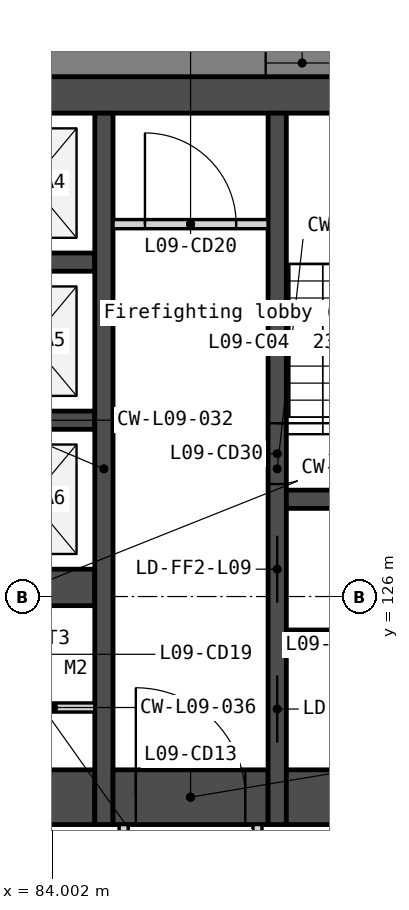
"""IFC4 building model, lengths in metres.
Left out: names, types, materials, properties, quantities, classifications, styles, units other than length and angle.
Written with IfcOpenShell. Run it as: python <this file> out.ifc"""

import sys

from ifc_helpers import new_model, si_unit, direction, frame, frame_2d, origin, place, context, subcontext, project, spatial, polyline, rectangle, outline, extrude, element, fill, save


model = new_model("IFC4")
c1 = context("Model", 3, precision=1e-05, world=origin(), true_north=direction((0.0, 1.0)))
c2 = subcontext(c1, "Body", "Model", "MODEL_VIEW")
j1 = project(units=[si_unit("LENGTHUNIT", "METRE"), si_unit("PLANEANGLEUNIT", "RADIAN")], contexts=[c1])
p1 = place(None, origin())
s1 = spatial("IfcSite", under=j1, at=p1, CompositionType="ELEMENT")
p2 = place(p1, origin())
s2 = spatial("IfcBuilding", under=s1, at=p2, CompositionType="ELEMENT")
p3 = place(p2, frame((0.0, 0.0, 45.5)))
s3 = spatial("IfcBuildingStorey", under=s2, at=p3, CompositionType="ELEMENT", Elevation=45.5)
p4 = place(p3, frame((66.0, 134.25, 0.0), z_axis=(0.0, 0.0, 1.0), x_axis=(1.0, 0.0, 0.0)))
e1 = element("IfcWall", 1, at=p4, inside=s3, PredefinedType="SOLIDWALL", context=c2, shape_type="SweptSolid", body=[
    extrude(rectangle(XDim=28.0, YDim=0.6, at=frame_2d((14.0, 0.0))), origin(), (0.0, 0.0, 1.0), 3.35),
])
p5 = place(p3, frame((81.8, 122.7, 0.0), z_axis=(0.0, 0.0, 1.0), x_axis=(1.0, 0.0, 0.0)))
e2 = element("IfcWall", 2, at=p5, inside=s3, PredefinedType="SOLIDWALL", context=c2, shape_type="SweptSolid", body=[
    extrude(rectangle(XDim=2.9, YDim=0.9, at=frame_2d((1.45, 0.0))), origin(), (0.0, 0.0, 1.0), 3.35),
])
p6 = place(p5, frame((0.05, 0.0, 0.0)))
e3 = element("IfcOpeningElement", 3, at=p6, cuts=e2, PredefinedType="OPENING", context=c2, shape_type="SweptSolid", body=[
    extrude(rectangle(XDim=1.5, YDim=2.1, at=frame_2d((0.75, 1.05))), frame((0.0, 0.46, 0.0), z_axis=(0.0, -1.0, 0.0), x_axis=(1.0, 0.0, 0.0)), (0.0, 0.0, 1.0), 0.92),
])
for number, where, z_axis, x_axis in (
    (4, (82.6, 131.5, 0.0), (0.0, 0.0, 1.0), (1.0, 0.0, 0.0)),
    (5, (82.6, 128.9, 0.0), (0.0, 0.0, 1.0), (1.0, 0.0, 0.0)),
):
    element("IfcWall", number, at=place(p3, frame(where, z_axis=z_axis, x_axis=x_axis)), inside=s3, PredefinedType="SOLIDWALL", context=c2, shape_type="SweptSolid", body=[
        extrude(rectangle(XDim=2.1, YDim=0.3, at=frame_2d((1.05, 0.0))), origin(), (0.0, 0.0, 1.0), 3.35),
    ])
p7 = place(p3, frame((82.6, 126.15, 0.0), z_axis=(0.0, 0.0, 1.0), x_axis=(1.0, 0.0, 0.0)))
e6 = element("IfcWall", 6, at=p7, inside=s3, PredefinedType="SOLIDWALL", context=c2, shape_type="SweptSolid", body=[
    extrude(rectangle(XDim=2.1, YDim=0.6, at=frame_2d((1.05, 0.0))), origin(), (0.0, 0.0, 1.0), 3.35),
])
p8 = place(p3, frame((83.35, 124.175, 0.0), z_axis=(0.0, 0.0, 1.0), x_axis=(1.0, 0.0, 0.0)))
e7 = element("IfcWall", 7, at=p8, inside=s3, PredefinedType="PARTITIONING", context=c2, shape_type="SweptSolid", body=[
    extrude(rectangle(XDim=1.35, YDim=0.15, at=frame_2d((0.675, 0.0))), origin(), (0.0, 0.0, 1.0), 3.35),
])
p9 = place(p3, frame((84.85, 133.95, 0.0), z_axis=(0.0, 0.0, 1.0), x_axis=(0.0, -1.0, 0.0)))
e8 = element("IfcWall", 8, at=p9, inside=s3, PredefinedType="SOLIDWALL", context=c2, shape_type="SweptSolid", body=[
    extrude(rectangle(XDim=11.7, YDim=0.3, at=frame_2d((5.85, 0.0))), origin(), (0.0, 0.0, 1.0), 3.35),
])
p10 = place(p3, frame((85.0, 132.125, 0.0), z_axis=(0.0, 0.0, 1.0), x_axis=(1.0, 0.0, 0.0)))
e9 = element("IfcWall", 9, at=p10, inside=s3, PredefinedType="PARTITIONING", context=c2, shape_type="SweptSolid", body=[
    extrude(rectangle(XDim=2.55, YDim=0.15, at=frame_2d((1.275, 0.0))), origin(), (0.0, 0.0, 1.0), 3.35),
])
p11 = place(p10, frame((0.525, 0.0, 0.0)))
e10 = element("IfcOpeningElement", 10, at=p11, cuts=e9, PredefinedType="OPENING", context=c2, shape_type="SweptSolid", body=[
    extrude(rectangle(XDim=1.5, YDim=2.1, at=frame_2d((0.75, 1.05))), frame((0.0, 0.085, 0.0), z_axis=(0.0, -1.0, 0.0), x_axis=(1.0, 0.0, 0.0)), (0.0, 0.0, 1.0), 0.17),
])
p12 = place(p3, frame((85.0, 122.7, 0.0), z_axis=(0.0, 0.0, 1.0), x_axis=(1.0, 0.0, 0.0)))
e11 = element("IfcWall", 11, at=p12, inside=s3, PredefinedType="SOLIDWALL", context=c2, shape_type="SweptSolid", body=[
    extrude(rectangle(XDim=2.55, YDim=0.9, at=frame_2d((1.275, 0.0))), origin(), (0.0, 0.0, 1.0), 3.35),
])
p13 = place(p12, frame((0.375, 0.0, 0.0)))
e12 = element("IfcOpeningElement", 12, at=p13, cuts=e11, PredefinedType="OPENING", context=c2, shape_type="SweptSolid", body=[
    extrude(rectangle(XDim=1.8, YDim=2.1, at=frame_2d((0.9, 1.05))), frame((0.0, 0.46, 0.0), z_axis=(0.0, -1.0, 0.0), x_axis=(1.0, 0.0, 0.0)), (0.0, 0.0, 1.0), 0.92),
])
p14 = place(p3, frame((85.175, 122.25, 0.0), z_axis=(0.0, 0.0, 1.0), x_axis=(0.0, -1.0, 0.0)))
e13 = element("IfcWall", 13, at=p14, inside=s3, PredefinedType="PARTITIONING", context=c2, shape_type="SweptSolid", body=[
    extrude(rectangle(XDim=2.1, YDim=0.15, at=frame_2d((1.05, 0.0))), origin(), (0.0, 0.0, 1.0), 3.35),
])
p15 = place(p14, frame((0.55, 0.0, 0.0)))
e14 = element("IfcOpeningElement", 14, at=p15, cuts=e13, PredefinedType="OPENING", context=c2, shape_type="SweptSolid", body=[
    extrude(rectangle(XDim=1.0, YDim=2.1, at=frame_2d((0.5, 1.05))), frame((0.0, 0.085, 0.0), z_axis=(0.0, -1.0, 0.0), x_axis=(1.0, 0.0, 0.0)), (0.0, 0.0, 1.0), 0.17),
])
p16 = place(p3, frame((87.375, 122.25, 0.0), z_axis=(0.0, 0.0, 1.0), x_axis=(0.0, -1.0, 0.0)))
e15 = element("IfcWall", 15, at=p16, inside=s3, PredefinedType="PARTITIONING", context=c2, shape_type="SweptSolid", body=[
    extrude(rectangle(XDim=2.1, YDim=0.15, at=frame_2d((1.05, 0.0))), origin(), (0.0, 0.0, 1.0), 3.35),
])
p17 = place(p3, frame((87.7, 133.95, 0.0), z_axis=(0.0, 0.0, 1.0), x_axis=(0.0, -1.0, 0.0)))
e16 = element("IfcWall", 16, at=p17, inside=s3, PredefinedType="SOLIDWALL", context=c2, shape_type="SweptSolid", body=[
    extrude(rectangle(XDim=11.7, YDim=0.3, at=frame_2d((5.85, 0.0))), origin(), (0.0, 0.0, 1.0), 3.35),
])
p18 = place(p17, frame((6.95, 0.0, 0.0)))
e17 = element("IfcOpeningElement", 17, at=p18, cuts=e16, PredefinedType="OPENING", context=c2, shape_type="SweptSolid", body=[
    extrude(rectangle(XDim=1.1, YDim=2.1, at=frame_2d((0.55, 1.05))), frame((0.0, 0.16, 0.0), z_axis=(0.0, -1.0, 0.0), x_axis=(1.0, 0.0, 0.0)), (0.0, 0.0, 1.0), 0.32),
])
p19 = place(p17, frame((5.1, 0.0, 0.0)))
e18 = element("IfcOpeningElement", 18, at=p19, cuts=e16, PredefinedType="OPENING", context=c2, shape_type="SweptSolid", body=[
    extrude(rectangle(XDim=1.0, YDim=2.1, at=frame_2d((0.5, 1.05))), frame((0.0, 0.16, 0.0), z_axis=(0.0, -1.0, 0.0), x_axis=(1.0, 0.0, 0.0)), (0.0, 0.0, 1.0), 0.32),
])
p20 = place(p17, frame((9.25, 0.0, 0.0)))
e19 = element("IfcOpeningElement", 19, at=p20, cuts=e16, PredefinedType="OPENING", context=c2, shape_type="SweptSolid", body=[
    extrude(rectangle(XDim=1.1, YDim=2.1, at=frame_2d((0.55, 1.05))), frame((0.0, 0.16, 0.0), z_axis=(0.0, -1.0, 0.0), x_axis=(1.0, 0.0, 0.0)), (0.0, 0.0, 1.0), 0.32),
])
for number, where, z_axis, x_axis in (
    (20, (87.85, 127.6, 0.0), (0.0, 0.0, 1.0), (1.0, 0.0, 0.0)),
    (21, (87.85, 125.3, 0.0), (0.0, 0.0, 1.0), (1.0, 0.0, 0.0)),
):
    element("IfcWall", number, at=place(p3, frame(where, z_axis=z_axis, x_axis=x_axis)), inside=s3, PredefinedType="SOLIDWALL", context=c2, shape_type="SweptSolid", body=[
        extrude(rectangle(XDim=2.55, YDim=0.3, at=frame_2d((1.275, 0.0))), origin(), (0.0, 0.0, 1.0), 3.35),
    ])
p21 = place(p3, frame((87.85, 122.7, 0.0), z_axis=(0.0, 0.0, 1.0), x_axis=(1.0, 0.0, 0.0)))
e22 = element("IfcWall", 22, at=p21, inside=s3, PredefinedType="SOLIDWALL", context=c2, shape_type="SweptSolid", body=[
    extrude(rectangle(XDim=2.55, YDim=0.9, at=frame_2d((1.275, 0.0))), origin(), (0.0, 0.0, 1.0), 3.35),
])
p22 = place(p3, frame((102.4, 134.775, -0.15), z_axis=(0.0, 0.0, 1.0), x_axis=(-1.0, 0.0, 0.0)))
e23 = element("IfcWall", 23, at=p22, inside=s3, PredefinedType="SOLIDWALL", context=c2, shape_type="SweptSolid", body=[
    extrude(outline(polyline([(0.0, 0.0), (0.0, 3.5), (38.62, 3.5), (38.62, 0.0), (0.0, 0.0)])), frame((0.0, 0.225, 0.0), z_axis=(0.0, -1.0, 0.0), x_axis=(1.0, 0.0, 0.0)), (0.0, 0.0, 1.0), 0.45),
])
p23 = place(p22, frame((3.03, 0.0, 1.05)))
e24 = element("IfcOpeningElement", 24, at=p23, cuts=e23, PredefinedType="OPENING", context=c2, shape_type="SweptSolid", body=[
    extrude(rectangle(XDim=1.2, YDim=1.5, at=frame_2d((0.6, 0.75))), frame((0.0, 0.235, 0.0), z_axis=(0.0, -1.0, 0.0), x_axis=(1.0, 0.0, 0.0)), (0.0, 0.0, 1.0), 0.47),
])
p24 = place(p22, frame((4.73, 0.0, 1.05)))
e25 = element("IfcOpeningElement", 25, at=p24, cuts=e23, PredefinedType="OPENING", context=c2, shape_type="SweptSolid", body=[
    extrude(rectangle(XDim=1.2, YDim=1.5, at=frame_2d((0.6, 0.75))), frame((0.0, 0.235, 0.0), z_axis=(0.0, -1.0, 0.0), x_axis=(1.0, 0.0, 0.0)), (0.0, 0.0, 1.0), 0.47),
])
p25 = place(p22, frame((11.99, 0.0, 1.05)))
e26 = element("IfcOpeningElement", 26, at=p25, cuts=e23, PredefinedType="OPENING", context=c2, shape_type="SweptSolid", body=[
    extrude(rectangle(XDim=1.2, YDim=1.5, at=frame_2d((0.6, 0.75))), frame((0.0, 0.235, 0.0), z_axis=(0.0, -1.0, 0.0), x_axis=(1.0, 0.0, 0.0)), (0.0, 0.0, 1.0), 0.47),
])
p26 = place(p22, frame((13.69, 0.0, 1.05)))
e27 = element("IfcOpeningElement", 27, at=p26, cuts=e23, PredefinedType="OPENING", context=c2, shape_type="SweptSolid", body=[
    extrude(rectangle(XDim=1.2, YDim=1.5, at=frame_2d((0.6, 0.75))), frame((0.0, 0.235, 0.0), z_axis=(0.0, -1.0, 0.0), x_axis=(1.0, 0.0, 0.0)), (0.0, 0.0, 1.0), 0.47),
])
p27 = place(p22, frame((20.95, 0.0, 1.05)))
e28 = element("IfcOpeningElement", 28, at=p27, cuts=e23, PredefinedType="OPENING", context=c2, shape_type="SweptSolid", body=[
    extrude(rectangle(XDim=1.2, YDim=1.5, at=frame_2d((0.6, 0.75))), frame((0.0, 0.235, 0.0), z_axis=(0.0, -1.0, 0.0), x_axis=(1.0, 0.0, 0.0)), (0.0, 0.0, 1.0), 0.47),
])
p28 = place(p22, frame((22.65, 0.0, 1.05)))
e29 = element("IfcOpeningElement", 29, at=p28, cuts=e23, PredefinedType="OPENING", context=c2, shape_type="SweptSolid", body=[
    extrude(rectangle(XDim=1.2, YDim=1.5, at=frame_2d((0.6, 0.75))), frame((0.0, 0.235, 0.0), z_axis=(0.0, -1.0, 0.0), x_axis=(1.0, 0.0, 0.0)), (0.0, 0.0, 1.0), 0.47),
])
p29 = place(p22, frame((29.91, 0.0, 1.05)))
e30 = element("IfcOpeningElement", 30, at=p29, cuts=e23, PredefinedType="OPENING", context=c2, shape_type="SweptSolid", body=[
    extrude(rectangle(XDim=1.2, YDim=1.5, at=frame_2d((0.6, 0.75))), frame((0.0, 0.235, 0.0), z_axis=(0.0, -1.0, 0.0), x_axis=(1.0, 0.0, 0.0)), (0.0, 0.0, 1.0), 0.47),
])
p30 = place(p22, frame((31.61, 0.0, 1.05)))
e31 = element("IfcOpeningElement", 31, at=p30, cuts=e23, PredefinedType="OPENING", context=c2, shape_type="SweptSolid", body=[
    extrude(rectangle(XDim=1.2, YDim=1.5, at=frame_2d((0.6, 0.75))), frame((0.0, 0.235, 0.0), z_axis=(0.0, -1.0, 0.0), x_axis=(1.0, 0.0, 0.0)), (0.0, 0.0, 1.0), 0.47),
])
p31 = place(p3, frame((83.105, 90.599, -0.15), z_axis=(0.0, 0.0, 1.0), x_axis=(0.499999201451, 0.866025864826, 0.0)))
e32 = element("IfcWall", 32, at=p31, inside=s3, PredefinedType="SOLIDWALL", context=c2, shape_type="SweptSolid", body=[
    extrude(outline(polyline([(44.8, 0.0), (44.8, 3.5), (0.0, 3.5), (0.0, 0.0), (44.8, 0.0)])), frame((0.0, 0.225, 0.0), z_axis=(0.0, -1.0, 0.0), x_axis=(1.0, 0.0, 0.0)), (0.0, 0.0, 1.0), 0.45),
])
p32 = place(p31, frame((3.03, 0.0, 1.05)))
e33 = element("IfcOpeningElement", 33, at=p32, cuts=e32, PredefinedType="OPENING", context=c2, shape_type="SweptSolid", body=[
    extrude(rectangle(XDim=1.2, YDim=1.5, at=frame_2d((0.6, 0.75))), frame((0.0, 0.235, 0.0), z_axis=(0.0, -1.0, 0.0), x_axis=(1.0, 0.0, 0.0)), (0.0, 0.0, 1.0), 0.47),
])
p33 = place(p31, frame((4.73, 0.0, 1.05)))
e34 = element("IfcOpeningElement", 34, at=p33, cuts=e32, PredefinedType="OPENING", context=c2, shape_type="SweptSolid", body=[
    extrude(rectangle(XDim=1.2, YDim=1.5, at=frame_2d((0.6, 0.75))), frame((0.0, 0.235, 0.0), z_axis=(0.0, -1.0, 0.0), x_axis=(1.0, 0.0, 0.0)), (0.0, 0.0, 1.0), 0.47),
])
p34 = place(p31, frame((11.99, 0.0, 1.05)))
e35 = element("IfcOpeningElement", 35, at=p34, cuts=e32, PredefinedType="OPENING", context=c2, shape_type="SweptSolid", body=[
    extrude(rectangle(XDim=1.2, YDim=1.5, at=frame_2d((0.6, 0.75))), frame((0.0, 0.235, 0.0), z_axis=(0.0, -1.0, 0.0), x_axis=(1.0, 0.0, 0.0)), (0.0, 0.0, 1.0), 0.47),
])
p35 = place(p31, frame((13.69, 0.0, 1.05)))
e36 = element("IfcOpeningElement", 36, at=p35, cuts=e32, PredefinedType="OPENING", context=c2, shape_type="SweptSolid", body=[
    extrude(rectangle(XDim=1.2, YDim=1.5, at=frame_2d((0.6, 0.75))), frame((0.0, 0.235, 0.0), z_axis=(0.0, -1.0, 0.0), x_axis=(1.0, 0.0, 0.0)), (0.0, 0.0, 1.0), 0.47),
])
p36 = place(p31, frame((20.95, 0.0, 1.05)))
e37 = element("IfcOpeningElement", 37, at=p36, cuts=e32, PredefinedType="OPENING", context=c2, shape_type="SweptSolid", body=[
    extrude(rectangle(XDim=1.2, YDim=1.5, at=frame_2d((0.6, 0.75))), frame((0.0, 0.235, 0.0), z_axis=(0.0, -1.0, 0.0), x_axis=(1.0, 0.0, 0.0)), (0.0, 0.0, 1.0), 0.47),
])
p37 = place(p31, frame((22.65, 0.0, 1.05)))
e38 = element("IfcOpeningElement", 38, at=p37, cuts=e32, PredefinedType="OPENING", context=c2, shape_type="SweptSolid", body=[
    extrude(rectangle(XDim=1.2, YDim=1.5, at=frame_2d((0.6, 0.75))), frame((0.0, 0.235, 0.0), z_axis=(0.0, -1.0, 0.0), x_axis=(1.0, 0.0, 0.0)), (0.0, 0.0, 1.0), 0.47),
])
p38 = place(p31, frame((29.91, 0.0, 1.05)))
e39 = element("IfcOpeningElement", 39, at=p38, cuts=e32, PredefinedType="OPENING", context=c2, shape_type="SweptSolid", body=[
    extrude(rectangle(XDim=1.2, YDim=1.5, at=frame_2d((0.6, 0.75))), frame((0.0, 0.235, 0.0), z_axis=(0.0, -1.0, 0.0), x_axis=(1.0, 0.0, 0.0)), (0.0, 0.0, 1.0), 0.47),
])
p39 = place(p31, frame((31.61, 0.0, 1.05)))
e40 = element("IfcOpeningElement", 40, at=p39, cuts=e32, PredefinedType="OPENING", context=c2, shape_type="SweptSolid", body=[
    extrude(rectangle(XDim=1.2, YDim=1.5, at=frame_2d((0.6, 0.75))), frame((0.0, 0.235, 0.0), z_axis=(0.0, -1.0, 0.0), x_axis=(1.0, 0.0, 0.0)), (0.0, 0.0, 1.0), 0.47),
])
p40 = place(p31, frame((38.87, 0.0, 1.05)))
e41 = element("IfcOpeningElement", 41, at=p40, cuts=e32, PredefinedType="OPENING", context=c2, shape_type="SweptSolid", body=[
    extrude(rectangle(XDim=1.2, YDim=1.5, at=frame_2d((0.6, 0.75))), frame((0.0, 0.235, 0.0), z_axis=(0.0, -1.0, 0.0), x_axis=(1.0, 0.0, 0.0)), (0.0, 0.0, 1.0), 0.47),
])
p41 = place(p31, frame((40.57, 0.0, 1.05)))
e42 = element("IfcOpeningElement", 42, at=p41, cuts=e32, PredefinedType="OPENING", context=c2, shape_type="SweptSolid", body=[
    extrude(rectangle(XDim=1.2, YDim=1.5, at=frame_2d((0.6, 0.75))), frame((0.0, 0.235, 0.0), z_axis=(0.0, -1.0, 0.0), x_axis=(1.0, 0.0, 0.0)), (0.0, 0.0, 1.0), 0.47),
])
p42 = place(p18, origin())
e43 = element("IfcDoor", 43, at=p42, inside=s3, OperationType="SLIDING_TO_LEFT", PredefinedType="DOOR", context=c2, shape_type="SweptSolid", body=[
    extrude(rectangle(XDim=1.1, YDim=2.1, at=frame_2d((0.55, 1.05))), frame((0.0, 0.025, 0.0), z_axis=(0.0, -1.0, 0.0), x_axis=(1.0, 0.0, 0.0)), (0.0, 0.0, 1.0), 0.05),
])
fill(e17, e43)
p43 = place(p13, origin())
e44 = element("IfcDoor", 44, at=p43, inside=s3, OperationType="DOUBLE_DOOR_DOUBLE_SWING", PredefinedType="DOOR", context=c2, shape_type="SweptSolid", body=[
    extrude(rectangle(XDim=1.8, YDim=2.1, at=frame_2d((0.9, 1.05))), frame((0.0, 0.025, 0.0), z_axis=(0.0, -1.0, 0.0), x_axis=(1.0, 0.0, 0.0)), (0.0, 0.0, 1.0), 0.05),
])
fill(e12, e44)
p44 = place(p11, origin())
e45 = element("IfcDoor", 45, at=p44, inside=s3, OperationType="DOUBLE_DOOR_DOUBLE_SWING", PredefinedType="DOOR", context=c2, shape_type="SweptSolid", body=[
    extrude(rectangle(XDim=1.5, YDim=2.1, at=frame_2d((0.75, 1.05))), frame((0.0, 0.025, 0.0), z_axis=(0.0, -1.0, 0.0), x_axis=(1.0, 0.0, 0.0)), (0.0, 0.0, 1.0), 0.05),
])
fill(e10, e45)
p45 = place(p19, origin())
e46 = element("IfcDoor", 46, at=p45, inside=s3, OperationType="SINGLE_SWING_LEFT", PredefinedType="DOOR", context=c2, shape_type="SweptSolid", body=[
    extrude(rectangle(XDim=1.0, YDim=2.1, at=frame_2d((0.5, 1.05))), frame((0.0, 0.025, 0.0), z_axis=(0.0, -1.0, 0.0), x_axis=(1.0, 0.0, 0.0)), (0.0, 0.0, 1.0), 0.05),
])
fill(e18, e46)
p46 = place(p20, origin())
e47 = element("IfcDoor", 47, at=p46, inside=s3, OperationType="SLIDING_TO_LEFT", PredefinedType="DOOR", context=c2, shape_type="SweptSolid", body=[
    extrude(rectangle(XDim=1.1, YDim=2.1, at=frame_2d((0.55, 1.05))), frame((0.0, 0.025, 0.0), z_axis=(0.0, -1.0, 0.0), x_axis=(1.0, 0.0, 0.0)), (0.0, 0.0, 1.0), 0.05),
])
fill(e19, e47)
p47 = place(p26, origin())
e48 = element("IfcWindow", 48, at=p47, inside=s3, PartitioningType="SINGLE_PANEL", PredefinedType="WINDOW", context=c2, shape_type="SweptSolid", body=[
    extrude(rectangle(XDim=1.2, YDim=1.5, at=frame_2d((0.6, 0.75))), frame((0.0, 0.03, 0.0), z_axis=(0.0, -1.0, 0.0), x_axis=(1.0, 0.0, 0.0)), (0.0, 0.0, 1.0), 0.06),
])
fill(e27, e48)
save(model, sys.argv[1])
